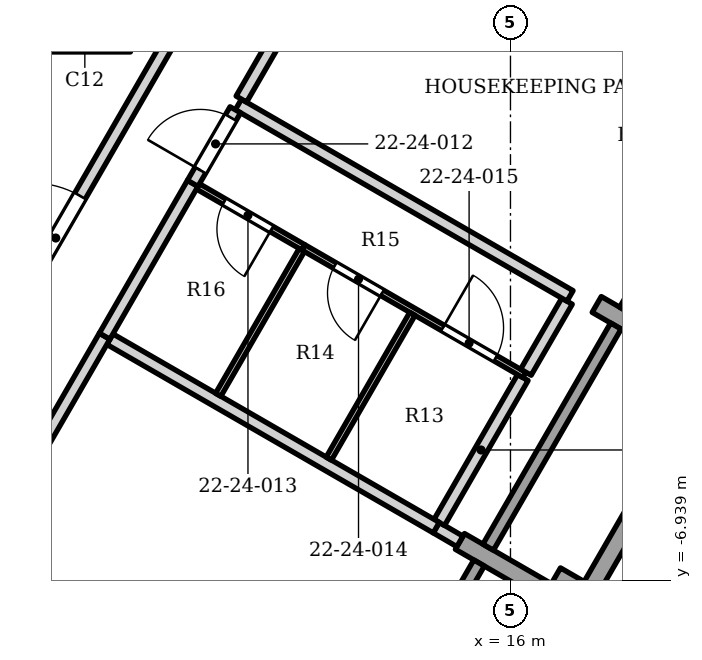
"""IFC4 building model, lengths in metres.
Left out: names, types, materials, properties, quantities, classifications, styles, units other than length and angle.
Written with IfcOpenShell. Run it as: python <this file> out.ifc"""

import sys

from ifc_helpers import new_model, si_unit, direction, frame, frame_2d, origin, place, context, subcontext, project, spatial, rectangle, extrude, element, fill, save


model = new_model("IFC4")
c1 = context("Model", 3, precision=1e-05, world=origin(), true_north=direction((0.0, 1.0)))
c2 = subcontext(c1, "Body", "Model", "MODEL_VIEW")
j1 = project(units=[si_unit("LENGTHUNIT", "METRE"), si_unit("PLANEANGLEUNIT", "RADIAN")], contexts=[c1])
p1 = place(None, origin())
s1 = spatial("IfcSite", under=j1, at=p1, CompositionType="ELEMENT")
p2 = place(p1, origin())
s2 = spatial("IfcBuilding", under=s1, at=p2, CompositionType="ELEMENT")
p3 = place(p2, frame((0.0, 0.0, 102.0)))
s3 = spatial("IfcBuildingStorey", under=s2, at=p3, CompositionType="ELEMENT", Elevation=102.0)
p4 = place(p3, frame((17.637, -7.724, 0.0), z_axis=(0.0, 0.0, 1.0), x_axis=(-0.865955154139, 0.50012165622, 0.0)))
e1 = element("IfcWall", 1, at=p4, inside=s3, PredefinedType="SOLIDWALL", context=c2, shape_type="SweptSolid", body=[
    extrude(rectangle(XDim=1.2, YDim=0.9, at=frame_2d((0.6, 0.0))), origin(), (0.0, 0.0, 1.0), 2.63),
])
p5 = place(p3, frame((15.169, -6.299, 0.0), z_axis=(0.0, 0.0, 1.0), x_axis=(0.866040211805, -0.499974350878, 0.0)))
e2 = element("IfcWall", 2, at=p5, inside=s3, PredefinedType="SOLIDWALL", context=c2, shape_type="SweptSolid", body=[
    extrude(rectangle(XDim=1.65, YDim=0.3, at=frame_2d((0.825, 0.0))), origin(), (0.0, 0.0, 1.0), 2.65),
])
p6 = place(p3, frame((17.419, -2.402, 0.0), z_axis=(0.0, 0.0, 1.0), x_axis=(0.866003217194, -0.500038426333, 0.0)))
e3 = element("IfcWall", 3, at=p6, inside=s3, PredefinedType="SOLIDWALL", context=c2, shape_type="SweptSolid", body=[
    extrude(rectangle(XDim=1.65, YDim=0.3, at=frame_2d((0.825, 0.0))), origin(), (0.0, 0.0, 1.0), 2.65),
])
p7 = place(p3, frame((13.383, -10.291, 0.0), z_axis=(0.0, 0.0, 1.0), x_axis=(0.500027713859, 0.866009402589, 0.0)))
e4 = element("IfcWall", 4, at=p7, inside=s3, PredefinedType="ELEMENTEDWALL", context=c2, shape_type="SweptSolid", body=[
    extrude(rectangle(XDim=4.2, YDim=0.2, at=frame_2d((2.1, 0.0))), origin(), (0.0, 0.0, 1.0), 2.384),
])
p8 = place(p3, frame((17.342, -7.034, 0.0), z_axis=(0.0, 0.0, 1.0), x_axis=(0.500012057535, 0.866018442252, 0.0)))
e5 = element("IfcWall", 5, at=p8, inside=s3, PredefinedType="SOLIDWALL", context=c2, shape_type="SweptSolid", body=[
    extrude(rectangle(XDim=3.6, YDim=0.3, at=frame_2d((1.8, 0.0))), origin(), (0.0, 0.0, 1.0), 2.63),
])
p9 = place(p3, frame((15.633, -6.394, 0.0), z_axis=(0.0, 0.0, 1.0), x_axis=(0.500002543286, 0.866023935413, 0.0)))
e6 = element("IfcWall", 6, at=p9, inside=s3, PredefinedType="ELEMENTEDWALL", context=c2, shape_type="SweptSolid", body=[
    extrude(rectangle(XDim=4.2, YDim=0.2, at=frame_2d((2.1, 0.0))), origin(), (0.0, 0.0, 1.0), 2.65),
])
p10 = place(p3, frame((17.883, -2.497, 0.0), z_axis=(0.0, 0.0, 1.0), x_axis=(0.500027713859, 0.866009402589, 0.0)))
e7 = element("IfcWall", 7, at=p10, inside=s3, PredefinedType="ELEMENTEDWALL", context=c2, shape_type="SweptSolid", body=[
    extrude(rectangle(XDim=4.2, YDim=0.2, at=frame_2d((2.1, 0.0))), origin(), (0.0, 0.0, 1.0), 2.65),
])
p11 = place(p10, frame((0.3, 0.0, 0.6)))
e8 = element("IfcOpeningElement", 8, at=p11, cuts=e7, PredefinedType="OPENING", context=c2, shape_type="SweptSolid", body=[
    extrude(rectangle(XDim=2.1, YDim=1.8, at=frame_2d((1.05, 0.9))), frame((0.0, 0.11, 0.0), z_axis=(0.0, -1.0, 0.0), x_axis=(1.0, 0.0, 0.0)), (0.0, 0.0, 1.0), 0.22),
])
p12 = place(p10, frame((2.7, 0.0, 0.0)))
e9 = element("IfcOpeningElement", 9, at=p12, cuts=e7, PredefinedType="OPENING", context=c2, shape_type="SweptSolid", body=[
    extrude(rectangle(XDim=1.2, YDim=2.4, at=frame_2d((0.6, 1.2))), frame((0.0, 0.11, 0.0), z_axis=(0.0, -1.0, 0.0), x_axis=(1.0, 0.0, 0.0)), (0.0, 0.0, 1.0), 0.22),
])
p13 = place(p3, frame((4.201, -8.791, 0.0), z_axis=(0.0, 0.0, 1.0), x_axis=(0.500109238176, 0.865962325907, 0.0)))
e10 = element("IfcWall", 10, at=p13, inside=s3, PredefinedType="PARTITIONING", context=c2, shape_type="SweptSolid", body=[
    extrude(rectangle(XDim=14.424, YDim=0.2, at=frame_2d((7.212, 0.0))), origin(), (0.0, 0.0, 1.0), 2.384),
])
p14 = place(p13, frame((7.839, 0.0, 0.0)))
e11 = element("IfcOpeningElement", 11, at=p14, cuts=e10, PredefinedType="OPENING", context=c2, shape_type="SweptSolid", body=[
    extrude(rectangle(XDim=1.6, YDim=2.1, at=frame_2d((0.8, 1.05))), frame((0.0, 0.11, 0.0), z_axis=(0.0, -1.0, 0.0), x_axis=(1.0, 0.0, 0.0)), (0.0, 0.0, 1.0), 0.22),
])
p15 = place(p13, frame((4.58, 0.0, 0.0)))
e12 = element("IfcOpeningElement", 12, at=p15, cuts=e10, PredefinedType="OPENING", context=c2, shape_type="SweptSolid", body=[
    extrude(rectangle(XDim=1.6, YDim=2.1, at=frame_2d((0.8, 1.05))), frame((0.0, 0.11, 0.0), z_axis=(0.0, -1.0, 0.0), x_axis=(1.0, 0.0, 0.0)), (0.0, 0.0, 1.0), 0.22),
])
p16 = place(p3, frame((14.78, -6.072, 0.0), z_axis=(0.0, 0.0, 1.0), x_axis=(0.864034851378, -0.503431997, 0.0)))
e13 = element("IfcWall", 13, at=p16, inside=s3, PredefinedType="PARTITIONING", context=c2, shape_type="SweptSolid", body=[
    extrude(rectangle(XDim=0.449, YDim=0.2, at=frame_2d((0.225, 0.0))), origin(), (0.0, 0.0, 1.0), 3.23),
])
p17 = place(p3, frame((14.829, -5.987, 0.0), z_axis=(0.0, 0.0, 1.0), x_axis=(0.499517615464, 0.866303729555, 0.0)))
e14 = element("IfcWall", 14, at=p17, inside=s3, PredefinedType="PARTITIONING", context=c2, shape_type="SweptSolid", body=[
    extrude(rectangle(XDim=2.752, YDim=0.2, at=frame_2d((1.376, 0.0))), origin(), (0.0, 0.0, 1.0), 3.23),
])
p18 = place(p3, frame((12.593, -1.463, 0.0), z_axis=(0.0, 0.0, 1.0), x_axis=(0.866022890907, -0.500004352405, 0.0)))
e15 = element("IfcWall", 15, at=p18, inside=s3, PredefinedType="PARTITIONING", context=c2, shape_type="SweptSolid", body=[
    extrude(rectangle(XDim=4.198, YDim=0.1, at=frame_2d((2.099, 0.0))), origin(), (0.0, 0.0, 1.0), 2.384),
])
p19 = place(p18, frame((0.598, 0.0, 0.0)))
e16 = element("IfcOpeningElement", 16, at=p19, cuts=e15, PredefinedType="OPENING", context=c2, shape_type="SweptSolid", body=[
    extrude(rectangle(XDim=0.9, YDim=2.1, at=frame_2d((0.45, 1.05))), frame((0.0, 0.06, 0.0), z_axis=(0.0, -1.0, 0.0), x_axis=(1.0, 0.0, 0.0)), (0.0, 0.0, 1.0), 0.12),
])
p20 = place(p18, frame((2.648, 0.0, 0.0)))
e17 = element("IfcOpeningElement", 17, at=p20, cuts=e15, PredefinedType="OPENING", context=c2, shape_type="SweptSolid", body=[
    extrude(rectangle(XDim=1.0, YDim=2.1, at=frame_2d((0.5, 1.05))), frame((0.0, 0.06, 0.0), z_axis=(0.0, -1.0, 0.0), x_axis=(1.0, 0.0, 0.0)), (0.0, 0.0, 1.0), 0.12),
])
p21 = place(p3, frame((16.253, -3.517, 0.0), z_axis=(0.0, 0.0, 1.0), x_axis=(0.500922210472, 0.865492310223, 0.0)))
e18 = element("IfcWall", 18, at=p21, inside=s3, PredefinedType="PARTITIONING", context=c2, shape_type="SweptSolid", body=[
    extrude(rectangle(XDim=1.35, YDim=0.2, at=frame_2d((0.675, 0.0))), origin(), (0.0, 0.0, 1.0), 3.23),
])
p22 = place(p3, frame((9.412, -2.973, 0.0), z_axis=(0.0, 0.0, 1.0), x_axis=(0.866009125512, -0.500028193735, 0.0)))
e19 = element("IfcWall", 19, at=p22, inside=s3, PredefinedType="PARTITIONING", context=c2, shape_type="SweptSolid", body=[
    extrude(rectangle(XDim=6.198, YDim=0.2, at=frame_2d((3.099, 0.0))), origin(), (0.0, 0.0, 1.0), 2.384),
])
p23 = place(p3, frame((0.325, -18.513, 0.0), z_axis=(0.0, 0.0, 1.0), x_axis=(0.499996012009, 0.86602770624, 0.0)))
e20 = element("IfcWall", 20, at=p23, inside=s3, PredefinedType="PARTITIONING", context=c2, shape_type="SweptSolid", body=[
    extrude(rectangle(XDim=18.0, YDim=0.2, at=frame_2d((9.0, 0.0))), origin(), (0.0, 0.0, 1.0), 2.302),
])
p24 = place(p23, frame((8.2, 0.0, 0.0)))
e21 = element("IfcOpeningElement", 21, at=p24, cuts=e20, PredefinedType="OPENING", context=c2, shape_type="SweptSolid", body=[
    extrude(rectangle(XDim=1.6, YDim=2.1, at=frame_2d((0.8, 1.05))), frame((0.0, 0.11, 0.0), z_axis=(0.0, -1.0, 0.0), x_axis=(1.0, 0.0, 0.0)), (0.0, 0.0, 1.0), 0.22),
])
p25 = place(p3, frame((13.012, -4.938, 0.0), z_axis=(0.0, 0.0, 1.0), x_axis=(0.499968400327, 0.866043647095, 0.0)))
e22 = element("IfcWall", 22, at=p25, inside=s3, PredefinedType="PARTITIONING", context=c2, shape_type="SweptSolid", body=[
    extrude(rectangle(XDim=2.75, YDim=0.1, at=frame_2d((1.375, 0.0))), origin(), (0.0, 0.0, 1.0), 2.384),
])
p26 = place(p3, frame((11.525, 0.886, 0.0), z_axis=(0.0, 0.0, 1.0), x_axis=(0.866148153111, -0.499787331635, 0.0)))
e23 = element("IfcWall", 23, at=p26, inside=s3, PredefinedType="PARTITIONING", context=c2, shape_type="SweptSolid", body=[
    extrude(rectangle(XDim=6.298, YDim=0.2, at=frame_2d((3.149, 0.0))), origin(), (0.0, 0.0, 1.0), 2.384),
])
p27 = place(p3, frame((11.193, -3.888, 0.0), z_axis=(0.0, 0.0, 1.0), x_axis=(0.499996545922, 0.866027397988, 0.0)))
e24 = element("IfcWall", 24, at=p27, inside=s3, PredefinedType="PARTITIONING", context=c2, shape_type="SweptSolid", body=[
    extrude(rectangle(XDim=2.75, YDim=0.1, at=frame_2d((1.375, 0.0))), origin(), (0.0, 0.0, 1.0), 3.23),
])
p28 = place(p3, frame((10.861, -0.461, 0.0), z_axis=(0.0, 0.0, 1.0), x_axis=(0.865624045709, -0.500694529119, 0.0)))
e25 = element("IfcWall", 25, at=p28, inside=s3, PredefinedType="PARTITIONING", context=c2, shape_type="SweptSolid", body=[
    extrude(rectangle(XDim=2.0, YDim=0.1, at=frame_2d((1.0, 0.0))), origin(), (0.0, 0.0, 1.0), 3.23),
])
p29 = place(p28, frame((0.5, 0.0, 0.0)))
e26 = element("IfcOpeningElement", 26, at=p29, cuts=e25, PredefinedType="OPENING", context=c2, shape_type="SweptSolid", body=[
    extrude(rectangle(XDim=0.9, YDim=2.1, at=frame_2d((0.45, 1.05))), frame((0.0, 0.06, 0.0), z_axis=(0.0, -1.0, 0.0), x_axis=(1.0, 0.0, 0.0)), (0.0, 0.0, 1.0), 0.12),
])
p30 = place(p3, frame((9.326, -2.923, 0.0), z_axis=(0.0, 0.0, 1.0), x_axis=(0.499435738433, 0.866350935347, 0.0)))
e27 = element("IfcWall", 27, at=p30, inside=s3, PredefinedType="PARTITIONING", context=c2, shape_type="SweptSolid", body=[
    extrude(rectangle(XDim=2.9, YDim=0.2, at=frame_2d((1.45, 0.0))), origin(), (0.0, 0.0, 1.0), 3.23),
])
p31 = place(p3, frame((10.774, -0.411, 0.0), z_axis=(0.0, 0.0, 1.0), x_axis=(0.500926145599, 0.865490032672, 0.0)))
e28 = element("IfcWall", 28, at=p31, inside=s3, PredefinedType="PARTITIONING", context=c2, shape_type="SweptSolid", body=[
    extrude(rectangle(XDim=1.398, YDim=0.2, at=frame_2d((0.699, 0.0))), origin(), (0.0, 0.0, 1.0), 3.23),
])
p32 = place(p31, frame((0.25, 0.0, 0.0)))
e29 = element("IfcOpeningElement", 29, at=p32, cuts=e28, PredefinedType="OPENING", context=c2, shape_type="SweptSolid", body=[
    extrude(rectangle(XDim=1.0, YDim=2.1, at=frame_2d((0.5, 1.05))), frame((0.0, 0.11, 0.0), z_axis=(0.0, -1.0, 0.0), x_axis=(1.0, 0.0, 0.0)), (0.0, 0.0, 1.0), 0.22),
])
p33 = place(p3, frame((11.574, 0.975, 0.0), z_axis=(0.0, 0.0, 1.0), x_axis=(0.500078475469, 0.86598009121, 0.0)))
e30 = element("IfcWall", 30, at=p33, inside=s3, PredefinedType="PARTITIONING", context=c2, shape_type="SweptSolid", body=[
    extrude(rectangle(XDim=3.146, YDim=0.2, at=frame_2d((1.573, 0.0))), origin(), (0.0, 0.0, 1.0), 3.23),
])
p34 = place(p33, frame((1.122, 0.0, 0.0)))
e31 = element("IfcOpeningElement", 31, at=p34, cuts=e30, PredefinedType="OPENING", context=c2, shape_type="SweptSolid", body=[
    extrude(rectangle(XDim=0.9, YDim=2.1, at=frame_2d((0.45, 1.05))), frame((0.0, 0.11, 0.0), z_axis=(0.0, -1.0, 0.0), x_axis=(1.0, 0.0, 0.0)), (0.0, 0.0, 1.0), 0.22),
])
p35 = place(p14, origin())
e32 = element("IfcDoor", 32, at=p35, inside=s3, OperationType="DOUBLE_DOOR_SINGLE_SWING", PredefinedType="DOOR", context=c2, shape_type="SweptSolid", body=[
    extrude(rectangle(XDim=1.6, YDim=2.1, at=frame_2d((0.8, 1.05))), frame((0.0, 0.025, 0.0), z_axis=(0.0, -1.0, 0.0), x_axis=(1.0, 0.0, 0.0)), (0.0, 0.0, 1.0), 0.05),
])
fill(e11, e32)
p36 = place(p32, origin())
e33 = element("IfcDoor", 33, at=p36, inside=s3, OperationType="SINGLE_SWING_LEFT", PredefinedType="DOOR", context=c2, shape_type="SweptSolid", body=[
    extrude(rectangle(XDim=1.0, YDim=2.1, at=frame_2d((0.5, 1.05))), frame((0.0, 0.025, 0.0), z_axis=(0.0, -1.0, 0.0), x_axis=(1.0, 0.0, 0.0)), (0.0, 0.0, 1.0), 0.05),
])
fill(e29, e33)
p37 = place(p29, origin())
e34 = element("IfcDoor", 34, at=p37, inside=s3, OperationType="SINGLE_SWING_RIGHT", PredefinedType="DOOR", context=c2, shape_type="SweptSolid", body=[
    extrude(rectangle(XDim=0.9, YDim=2.1, at=frame_2d((0.45, 1.05))), frame((0.0, 0.025, 0.0), z_axis=(0.0, -1.0, 0.0), x_axis=(1.0, 0.0, 0.0)), (0.0, 0.0, 1.0), 0.05),
])
fill(e26, e34)
p38 = place(p19, origin())
e35 = element("IfcDoor", 35, at=p38, inside=s3, OperationType="SINGLE_SWING_RIGHT", PredefinedType="DOOR", context=c2, shape_type="SweptSolid", body=[
    extrude(rectangle(XDim=0.9, YDim=2.1, at=frame_2d((0.45, 1.05))), frame((0.0, 0.025, 0.0), z_axis=(0.0, -1.0, 0.0), x_axis=(1.0, 0.0, 0.0)), (0.0, 0.0, 1.0), 0.05),
])
fill(e16, e35)
p39 = place(p20, origin())
e36 = element("IfcDoor", 36, at=p39, inside=s3, OperationType="SINGLE_SWING_LEFT", PredefinedType="DOOR", context=c2, shape_type="SweptSolid", body=[
    extrude(rectangle(XDim=1.0, YDim=2.1, at=frame_2d((0.5, 1.05))), frame((0.0, 0.025, 0.0), z_axis=(0.0, -1.0, 0.0), x_axis=(1.0, 0.0, 0.0)), (0.0, 0.0, 1.0), 0.05),
])
fill(e17, e36)
save(model, sys.argv[1])
